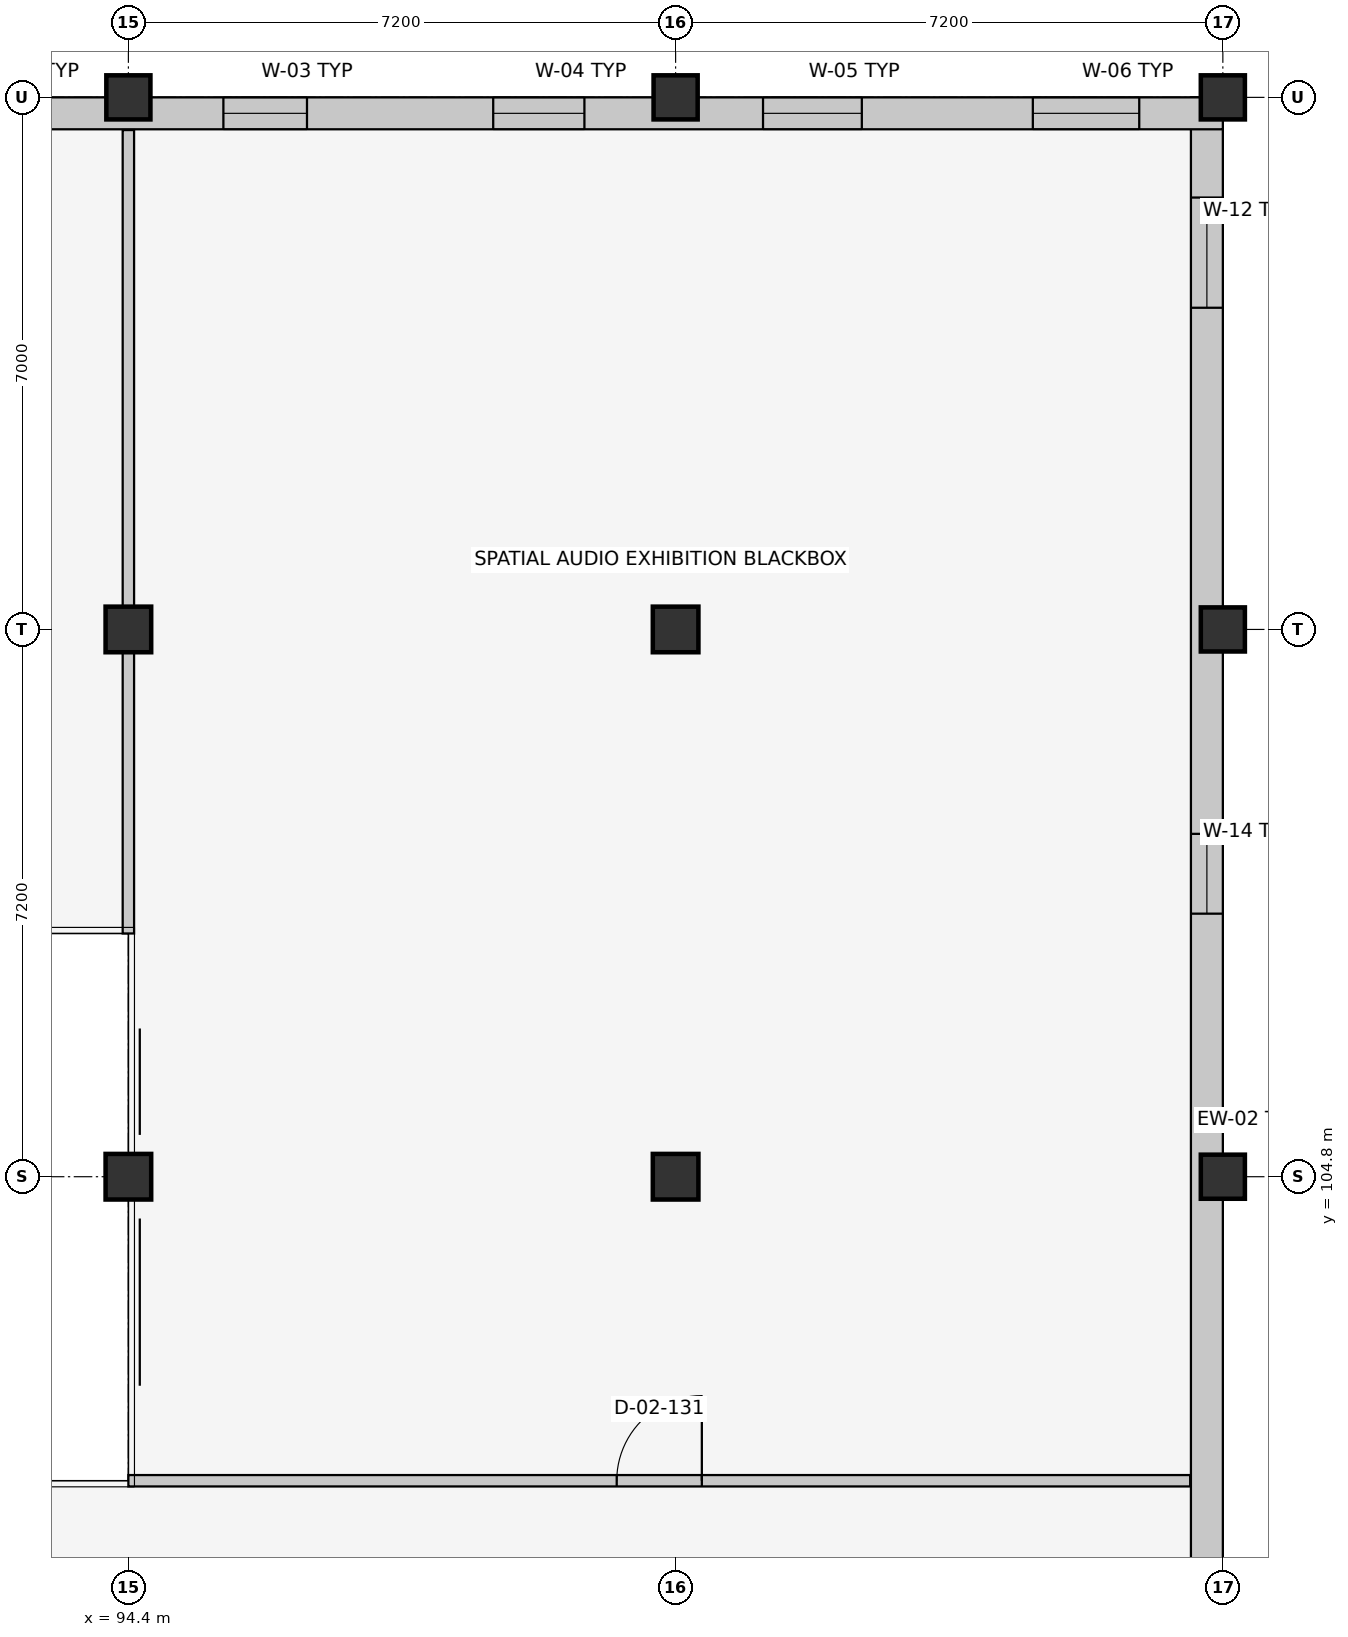
"""IFC4 building model, lengths in metres.
Left out: names, types, materials, properties, quantities, classifications, styles, units other than length and angle.
Written with IfcOpenShell. Run it as: python <this file> out.ifc"""

import sys

from ifc_helpers import new_model, si_unit, direction, frame, frame_2d, origin, origin_2d, place, context, subcontext, project, spatial, rectangle, extrude, element, fill, save


model = new_model("IFC4")
c1 = context("Model", 3, precision=1e-05, world=origin(), true_north=direction((0.0, 1.0)))
c2 = subcontext(c1, "Body", "Model", "MODEL_VIEW")
j1 = project(units=[si_unit("LENGTHUNIT", "METRE"), si_unit("PLANEANGLEUNIT", "RADIAN")], contexts=[c1])
p1 = place(None, origin())
s1 = spatial("IfcSite", under=j1, at=p1, CompositionType="ELEMENT")
p2 = place(p1, origin())
s2 = spatial("IfcBuilding", under=s1, at=p2, CompositionType="ELEMENT")
p3 = place(p2, frame((0.0, 0.0, 9.6)))
s3 = spatial("IfcBuildingStorey", under=s2, at=p3, CompositionType="ELEMENT", Elevation=9.6)
for number, where, z_axis, x_axis in (
    (1, (94.4, 104.8, 0.0), (0.0, 0.0, 1.0), (1.0, 0.0, 0.0)),
    (2, (94.4, 112.0, 0.0), (0.0, 0.0, 1.0), (1.0, 0.0, 0.0)),
):
    element("IfcColumn", number, at=place(p3, frame(where, z_axis=z_axis, x_axis=x_axis)), inside=s3, PredefinedType="COLUMN", context=c2, shape_type="SweptSolid", body=[
        extrude(rectangle(XDim=0.6, YDim=0.6, at=origin_2d()), origin(), (0.0, 0.0, 1.0), 4.2),
    ])
p4 = place(p3, frame((94.4, 119.0, 0.0), z_axis=(0.0, 0.0, 1.0), x_axis=(1.0, 0.0, 0.0)))
e3 = element("IfcColumn", 3, at=p4, inside=s3, PredefinedType="COLUMN", context=c2, shape_type="SweptSolid", body=[
    extrude(rectangle(XDim=0.58, YDim=0.58, at=origin_2d()), origin(), (0.0, 0.0, 1.0), 4.2),
])
for number, where, z_axis, x_axis in (
    (4, (101.6, 104.8, 0.0), (0.0, 0.0, 1.0), (1.0, 0.0, 0.0)),
    (5, (101.6, 112.0, 0.0), (0.0, 0.0, 1.0), (1.0, 0.0, 0.0)),
):
    element("IfcColumn", number, at=place(p3, frame(where, z_axis=z_axis, x_axis=x_axis)), inside=s3, PredefinedType="COLUMN", context=c2, shape_type="SweptSolid", body=[
        extrude(rectangle(XDim=0.6, YDim=0.6, at=origin_2d()), origin(), (0.0, 0.0, 1.0), 4.2),
    ])
for number, where, z_axis, x_axis in (
    (6, (101.6, 119.0, 0.0), (0.0, 0.0, 1.0), (1.0, 0.0, 0.0)),
    (7, (108.8, 104.8, 0.0), (0.0, 0.0, 1.0), (1.0, 0.0, 0.0)),
    (8, (108.8, 112.0, 0.0), (0.0, 0.0, 1.0), (1.0, 0.0, 0.0)),
    (9, (108.8, 119.0, 0.0), (0.0, 0.0, 1.0), (1.0, 0.0, 0.0)),
):
    element("IfcColumn", number, at=place(p3, frame(where, z_axis=z_axis, x_axis=x_axis)), inside=s3, PredefinedType="COLUMN", context=c2, shape_type="SweptSolid", body=[
        extrude(rectangle(XDim=0.58, YDim=0.58, at=origin_2d()), origin(), (0.0, 0.0, 1.0), 4.2),
    ])
p5 = place(p3, frame((108.59, 119.0, 0.0), z_axis=(0.0, 0.0, 1.0), x_axis=(0.0, -1.0, 0.0)))
e10 = element("IfcWall", 10, at=p5, inside=s3, PredefinedType="SOLIDWALL", context=c2, shape_type="SweptSolid", body=[
    extrude(rectangle(XDim=28.6, YDim=0.42, at=frame_2d((14.3, 0.0))), origin(), (0.0, 0.0, 1.0), 3.345),
])
p6 = place(p5, frame((1.318, 0.0, 0.9)))
e11 = element("IfcOpeningElement", 11, at=p6, cuts=e10, PredefinedType="OPENING", context=c2, shape_type="SweptSolid", body=[
    extrude(rectangle(XDim=1.45, YDim=1.45, at=frame_2d((0.725, 0.725))), frame((0.0, 0.222, 0.0), z_axis=(0.0, -1.0, 0.0), x_axis=(1.0, 0.0, 0.0)), (0.0, 0.0, 1.0), 0.444),
])
p7 = place(p5, frame((9.689, 0.0, 0.9)))
e12 = element("IfcOpeningElement", 12, at=p7, cuts=e10, PredefinedType="OPENING", context=c2, shape_type="SweptSolid", body=[
    extrude(rectangle(XDim=1.05, YDim=1.6, at=frame_2d((0.525, 0.8))), frame((0.0, 0.222, 0.0), z_axis=(0.0, -1.0, 0.0), x_axis=(1.0, 0.0, 0.0)), (0.0, 0.0, 1.0), 0.444),
])
p8 = place(p5, frame((25.807, 0.0, 0.9)))
e13 = element("IfcOpeningElement", 13, at=p8, cuts=e10, PredefinedType="OPENING", context=c2, shape_type="SweptSolid", body=[
    extrude(rectangle(XDim=1.5, YDim=1.6, at=frame_2d((0.75, 0.8))), frame((0.0, 0.222, 0.0), z_axis=(0.0, -1.0, 0.0), x_axis=(1.0, 0.0, 0.0)), (0.0, 0.0, 1.0), 0.444),
])
p9 = place(p3, frame((65.6, 118.79, 0.0), z_axis=(0.0, 0.0, 1.0), x_axis=(1.0, 0.0, 0.0)))
e14 = element("IfcWall", 14, at=p9, inside=s3, PredefinedType="SOLIDWALL", context=c2, shape_type="SweptSolid", body=[
    extrude(rectangle(XDim=43.2, YDim=0.42, at=frame_2d((21.6, 0.0))), origin(), (0.0, 0.0, 1.0), 3.245),
])
p10 = place(p9, frame((1.3, 0.0, 0.9)))
e15 = element("IfcOpeningElement", 15, at=p10, cuts=e14, PredefinedType="OPENING", context=c2, shape_type="SweptSolid", body=[
    extrude(rectangle(XDim=1.0, YDim=1.75, at=frame_2d((0.5, 0.875))), frame((0.0, 0.222, 0.0), z_axis=(0.0, -1.0, 0.0), x_axis=(1.0, 0.0, 0.0)), (0.0, 0.0, 1.0), 0.444),
])
p11 = place(p9, frame((4.84, 0.0, 0.9)))
e16 = element("IfcOpeningElement", 16, at=p11, cuts=e14, PredefinedType="OPENING", context=c2, shape_type="SweptSolid", body=[
    extrude(rectangle(XDim=1.12, YDim=1.75, at=frame_2d((0.56, 0.875))), frame((0.0, 0.222, 0.0), z_axis=(0.0, -1.0, 0.0), x_axis=(1.0, 0.0, 0.0)), (0.0, 0.0, 1.0), 0.444),
])
p12 = place(p9, frame((8.38, 0.0, 0.9)))
e17 = element("IfcOpeningElement", 17, at=p12, cuts=e14, PredefinedType="OPENING", context=c2, shape_type="SweptSolid", body=[
    extrude(rectangle(XDim=1.24, YDim=1.75, at=frame_2d((0.62, 0.875))), frame((0.0, 0.222, 0.0), z_axis=(0.0, -1.0, 0.0), x_axis=(1.0, 0.0, 0.0)), (0.0, 0.0, 1.0), 0.444),
])
p13 = place(p9, frame((11.93, 0.0, 0.9)))
e18 = element("IfcOpeningElement", 18, at=p13, cuts=e14, PredefinedType="OPENING", context=c2, shape_type="SweptSolid", body=[
    extrude(rectangle(XDim=1.34, YDim=1.75, at=frame_2d((0.67, 0.875))), frame((0.0, 0.222, 0.0), z_axis=(0.0, -1.0, 0.0), x_axis=(1.0, 0.0, 0.0)), (0.0, 0.0, 1.0), 0.444),
])
p14 = place(p9, frame((15.48, 0.0, 0.9)))
e19 = element("IfcOpeningElement", 19, at=p14, cuts=e14, PredefinedType="OPENING", context=c2, shape_type="SweptSolid", body=[
    extrude(rectangle(XDim=1.44, YDim=1.75, at=frame_2d((0.72, 0.875))), frame((0.0, 0.222, 0.0), z_axis=(0.0, -1.0, 0.0), x_axis=(1.0, 0.0, 0.0)), (0.0, 0.0, 1.0), 0.444),
])
p15 = place(p9, frame((19.05, 0.0, 0.9)))
e20 = element("IfcOpeningElement", 20, at=p15, cuts=e14, PredefinedType="OPENING", context=c2, shape_type="SweptSolid", body=[
    extrude(rectangle(XDim=1.5, YDim=1.75, at=frame_2d((0.75, 0.875))), frame((0.0, 0.222, 0.0), z_axis=(0.0, -1.0, 0.0), x_axis=(1.0, 0.0, 0.0)), (0.0, 0.0, 1.0), 0.444),
])
p16 = place(p9, frame((22.95, 0.0, 0.9)))
e21 = element("IfcOpeningElement", 21, at=p16, cuts=e14, PredefinedType="OPENING", context=c2, shape_type="SweptSolid", body=[
    extrude(rectangle(XDim=0.9, YDim=1.35, at=frame_2d((0.45, 0.675))), frame((0.0, 0.222, 0.0), z_axis=(0.0, -1.0, 0.0), x_axis=(1.0, 0.0, 0.0)), (0.0, 0.0, 1.0), 0.444),
])
p17 = place(p9, frame((26.5, 0.0, 0.9)))
e22 = element("IfcOpeningElement", 22, at=p17, cuts=e14, PredefinedType="OPENING", context=c2, shape_type="SweptSolid", body=[
    extrude(rectangle(XDim=1.0, YDim=1.35, at=frame_2d((0.5, 0.675))), frame((0.0, 0.222, 0.0), z_axis=(0.0, -1.0, 0.0), x_axis=(1.0, 0.0, 0.0)), (0.0, 0.0, 1.0), 0.444),
])
p18 = place(p9, frame((30.05, 0.0, 0.9)))
e23 = element("IfcOpeningElement", 23, at=p18, cuts=e14, PredefinedType="OPENING", context=c2, shape_type="SweptSolid", body=[
    extrude(rectangle(XDim=1.1, YDim=1.35, at=frame_2d((0.55, 0.675))), frame((0.0, 0.222, 0.0), z_axis=(0.0, -1.0, 0.0), x_axis=(1.0, 0.0, 0.0)), (0.0, 0.0, 1.0), 0.444),
])
p19 = place(p9, frame((33.6, 0.0, 0.9)))
e24 = element("IfcOpeningElement", 24, at=p19, cuts=e14, PredefinedType="OPENING", context=c2, shape_type="SweptSolid", body=[
    extrude(rectangle(XDim=1.2, YDim=1.35, at=frame_2d((0.6, 0.675))), frame((0.0, 0.222, 0.0), z_axis=(0.0, -1.0, 0.0), x_axis=(1.0, 0.0, 0.0)), (0.0, 0.0, 1.0), 0.444),
])
p20 = place(p9, frame((37.15, 0.0, 0.9)))
e25 = element("IfcOpeningElement", 25, at=p20, cuts=e14, PredefinedType="OPENING", context=c2, shape_type="SweptSolid", body=[
    extrude(rectangle(XDim=1.3, YDim=1.35, at=frame_2d((0.65, 0.675))), frame((0.0, 0.222, 0.0), z_axis=(0.0, -1.0, 0.0), x_axis=(1.0, 0.0, 0.0)), (0.0, 0.0, 1.0), 0.444),
])
p21 = place(p9, frame((40.7, 0.0, 0.9)))
e26 = element("IfcOpeningElement", 26, at=p21, cuts=e14, PredefinedType="OPENING", context=c2, shape_type="SweptSolid", body=[
    extrude(rectangle(XDim=1.4, YDim=1.35, at=frame_2d((0.7, 0.675))), frame((0.0, 0.222, 0.0), z_axis=(0.0, -1.0, 0.0), x_axis=(1.0, 0.0, 0.0)), (0.0, 0.0, 1.0), 0.444),
])
p22 = place(p3, frame((94.4, 108.0, 0.0), z_axis=(0.0, 0.0, 1.0), x_axis=(0.0, 1.0, 0.0)))
e27 = element("IfcWall", 27, at=p22, inside=s3, PredefinedType="PARTITIONING", context=c2, shape_type="SweptSolid", body=[
    extrude(rectangle(XDim=10.57, YDim=0.15, at=frame_2d((5.285, 0.0))), origin(), (0.0, 0.0, 1.0), 3.295),
])
p23 = place(p3, frame((94.4, 100.8, 0.0), z_axis=(0.0, 0.0, 1.0), x_axis=(1.0, 0.0, 0.0)))
e28 = element("IfcWall", 28, at=p23, inside=s3, PredefinedType="PARTITIONING", context=c2, shape_type="SweptSolid", body=[
    extrude(rectangle(XDim=13.97, YDim=0.15, at=frame_2d((6.985, 0.0))), origin(), (0.0, 0.0, 1.0), 3.92),
])
p24 = place(p23, frame((6.425, 0.0, 0.0)))
e29 = element("IfcOpeningElement", 29, at=p24, cuts=e28, PredefinedType="OPENING", context=c2, shape_type="SweptSolid", body=[
    extrude(rectangle(XDim=1.12, YDim=2.15, at=frame_2d((0.56, 1.075))), frame((0.0, 0.087, 0.0), z_axis=(0.0, -1.0, 0.0), x_axis=(1.0, 0.0, 0.0)), (0.0, 0.0, 1.0), 0.174),
])
p25 = place(p6, origin())
e30 = element("IfcWindow", 30, at=p25, inside=s3, PartitioningType="SINGLE_PANEL", PredefinedType="WINDOW", context=c2, shape_type="SweptSolid", body=[
    extrude(rectangle(XDim=1.45, YDim=1.45, at=frame_2d((0.725, 0.725))), frame((0.0, 0.03, 0.0), z_axis=(0.0, -1.0, 0.0), x_axis=(1.0, 0.0, 0.0)), (0.0, 0.0, 1.0), 0.06),
])
fill(e11, e30)
p26 = place(p7, origin())
e31 = element("IfcWindow", 31, at=p26, inside=s3, PartitioningType="SINGLE_PANEL", PredefinedType="WINDOW", context=c2, shape_type="SweptSolid", body=[
    extrude(rectangle(XDim=1.05, YDim=1.6, at=frame_2d((0.525, 0.8))), frame((0.0, 0.03, 0.0), z_axis=(0.0, -1.0, 0.0), x_axis=(1.0, 0.0, 0.0)), (0.0, 0.0, 1.0), 0.06),
])
fill(e12, e31)
p27 = place(p18, origin())
e32 = element("IfcWindow", 32, at=p27, inside=s3, PartitioningType="SINGLE_PANEL", PredefinedType="WINDOW", context=c2, shape_type="SweptSolid", body=[
    extrude(rectangle(XDim=1.1, YDim=1.35, at=frame_2d((0.55, 0.675))), frame((0.0, 0.03, 0.0), z_axis=(0.0, -1.0, 0.0), x_axis=(1.0, 0.0, 0.0)), (0.0, 0.0, 1.0), 0.06),
])
fill(e23, e32)
p28 = place(p19, origin())
e33 = element("IfcWindow", 33, at=p28, inside=s3, PartitioningType="SINGLE_PANEL", PredefinedType="WINDOW", context=c2, shape_type="SweptSolid", body=[
    extrude(rectangle(XDim=1.2, YDim=1.35, at=frame_2d((0.6, 0.675))), frame((0.0, 0.03, 0.0), z_axis=(0.0, -1.0, 0.0), x_axis=(1.0, 0.0, 0.0)), (0.0, 0.0, 1.0), 0.06),
])
fill(e24, e33)
p29 = place(p20, origin())
e34 = element("IfcWindow", 34, at=p29, inside=s3, PartitioningType="SINGLE_PANEL", PredefinedType="WINDOW", context=c2, shape_type="SweptSolid", body=[
    extrude(rectangle(XDim=1.3, YDim=1.35, at=frame_2d((0.65, 0.675))), frame((0.0, 0.03, 0.0), z_axis=(0.0, -1.0, 0.0), x_axis=(1.0, 0.0, 0.0)), (0.0, 0.0, 1.0), 0.06),
])
fill(e25, e34)
p30 = place(p21, origin())
e35 = element("IfcWindow", 35, at=p30, inside=s3, PartitioningType="SINGLE_PANEL", PredefinedType="WINDOW", context=c2, shape_type="SweptSolid", body=[
    extrude(rectangle(XDim=1.4, YDim=1.35, at=frame_2d((0.7, 0.675))), frame((0.0, 0.03, 0.0), z_axis=(0.0, -1.0, 0.0), x_axis=(1.0, 0.0, 0.0)), (0.0, 0.0, 1.0), 0.06),
])
fill(e26, e35)
p31 = place(p24, origin())
e36 = element("IfcDoor", 36, at=p31, inside=s3, OperationType="SINGLE_SWING_RIGHT", PredefinedType="DOOR", context=c2, shape_type="SweptSolid", body=[
    extrude(rectangle(XDim=1.12, YDim=2.15, at=frame_2d((0.56, 1.075))), frame((0.0, 0.025, 0.0), z_axis=(0.0, -1.0, 0.0), x_axis=(1.0, 0.0, 0.0)), (0.0, 0.0, 1.0), 0.05),
])
fill(e29, e36)
save(model, sys.argv[1])
